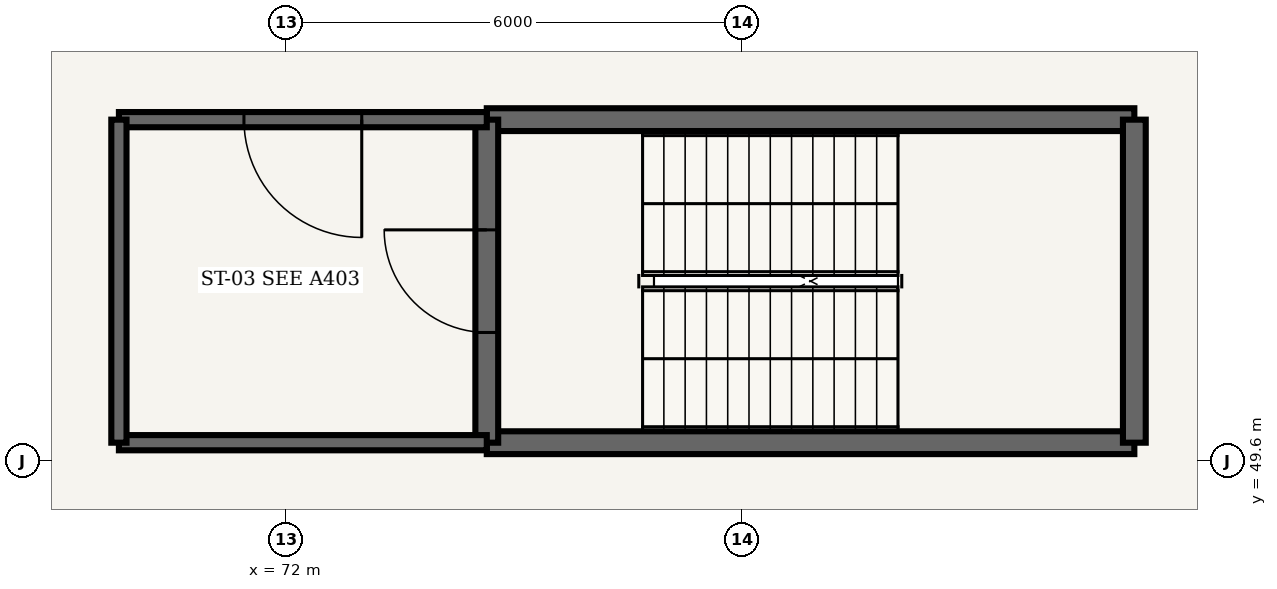
"""IFC4 building model, lengths in metres.
Left out: names, types, materials, properties, quantities, classifications, styles, units other than length and angle.
Written with IfcOpenShell. Run it as: python <this file> out.ifc"""

import sys

from ifc_helpers import new_model, si_unit, direction, frame, frame_2d, origin, place, context, subcontext, project, spatial, rectangle, extrude, element, fill, save


model = new_model("IFC4")
c1 = context("Model", 3, precision=1e-05, world=origin(), true_north=direction((0.0, 1.0)))
c2 = subcontext(c1, "Body", "Model", "MODEL_VIEW")
j1 = project(units=[si_unit("LENGTHUNIT", "METRE"), si_unit("PLANEANGLEUNIT", "RADIAN")], contexts=[c1])
p1 = place(None, origin())
s1 = spatial("IfcSite", under=j1, at=p1, CompositionType="ELEMENT")
p2 = place(p1, origin())
s2 = spatial("IfcBuilding", under=s1, at=p2, CompositionType="ELEMENT")
p3 = place(p2, frame((0.0, 0.0, 10.8)))
s3 = spatial("IfcBuildingStorey", under=s2, at=p3, CompositionType="ELEMENT", Elevation=10.8)
for number, where, z_axis, x_axis in (
    (1, (74.64, 49.84, 0.0), (0.0, 0.0, 1.0), (1.0, 0.0, 0.0)),
    (2, (83.16, 54.09, 0.0), (0.0, 0.0, 1.0), (-1.0, 0.0, 0.0)),
):
    element("IfcWall", number, at=place(p3, frame(where, z_axis=z_axis, x_axis=x_axis)), inside=s3, PredefinedType="SHEAR", context=c2, shape_type="SweptSolid", body=[
        extrude(rectangle(XDim=8.52, YDim=0.3, at=frame_2d((4.26, 0.0))), origin(), (0.0, 0.0, 1.0), 4.55),
    ])
p4 = place(p3, frame((74.64, 54.09, 0.0), z_axis=(0.0, 0.0, 1.0), x_axis=(0.0, -1.0, 0.0)))
e3 = element("IfcWall", 3, at=p4, inside=s3, PredefinedType="SHEAR", context=c2, shape_type="SweptSolid", body=[
    extrude(rectangle(XDim=4.25, YDim=0.3, at=frame_2d((2.125, 0.0))), origin(), (0.0, 0.0, 1.0), 4.55),
])
p5 = place(p4, frame((1.45, 0.0, 0.0)))
e4 = element("IfcOpeningElement", 4, at=p5, cuts=e3, PredefinedType="OPENING", context=c2, shape_type="SweptSolid", body=[
    extrude(rectangle(XDim=1.35, YDim=2.2, at=frame_2d((0.675, 1.1))), frame((0.0, 0.16, 0.0), z_axis=(0.0, -1.0, 0.0), x_axis=(1.0, 0.0, 0.0)), (0.0, 0.0, 1.0), 0.32),
])
p6 = place(p3, frame((83.16, 49.84, 0.0), z_axis=(0.0, 0.0, 1.0), x_axis=(0.0, 1.0, 0.0)))
e5 = element("IfcWall", 5, at=p6, inside=s3, PredefinedType="SHEAR", context=c2, shape_type="SweptSolid", body=[
    extrude(rectangle(XDim=4.25, YDim=0.3, at=frame_2d((2.125, 0.0))), origin(), (0.0, 0.0, 1.0), 4.55),
])
p7 = place(p3, frame((69.8, 49.84, 0.0), z_axis=(0.0, 0.0, 1.0), x_axis=(1.0, 0.0, 0.0)))
e6 = element("IfcWall", 6, at=p7, inside=s3, PredefinedType="SHEAR", context=c2, shape_type="SweptSolid", body=[
    extrude(rectangle(XDim=4.84, YDim=0.2, at=frame_2d((2.42, 0.0))), origin(), (0.0, 0.0, 1.0), 4.55),
])
p8 = place(p3, frame((74.64, 54.09, 0.0), z_axis=(0.0, 0.0, 1.0), x_axis=(-1.0, 0.0, 0.0)))
e7 = element("IfcWall", 7, at=p8, inside=s3, PredefinedType="SHEAR", context=c2, shape_type="SweptSolid", body=[
    extrude(rectangle(XDim=4.84, YDim=0.2, at=frame_2d((2.42, 0.0))), origin(), (0.0, 0.0, 1.0), 4.55),
])
p9 = place(p8, frame((1.645, 0.0, 0.0)))
e8 = element("IfcOpeningElement", 8, at=p9, cuts=e7, PredefinedType="OPENING", context=c2, shape_type="SweptSolid", body=[
    extrude(rectangle(XDim=1.55, YDim=2.2, at=frame_2d((0.775, 1.1))), frame((0.0, 0.11, 0.0), z_axis=(0.0, -1.0, 0.0), x_axis=(1.0, 0.0, 0.0)), (0.0, 0.0, 1.0), 0.22),
])
p10 = place(p3, frame((69.8, 54.09, 0.0), z_axis=(0.0, 0.0, 1.0), x_axis=(0.0, -1.0, 0.0)))
e9 = element("IfcWall", 9, at=p10, inside=s3, PredefinedType="SHEAR", context=c2, shape_type="SweptSolid", body=[
    extrude(rectangle(XDim=4.25, YDim=0.2, at=frame_2d((2.125, 0.0))), origin(), (0.0, 0.0, 1.0), 4.55),
])
p11 = place(p5, origin())
e10 = element("IfcDoor", 10, at=p11, inside=s3, OperationType="SINGLE_SWING_RIGHT", PredefinedType="DOOR", context=c2, shape_type="SweptSolid", body=[
    extrude(rectangle(XDim=1.35, YDim=2.2, at=frame_2d((0.675, 1.1))), frame((0.0, 0.025, 0.0), z_axis=(0.0, -1.0, 0.0), x_axis=(1.0, 0.0, 0.0)), (0.0, 0.0, 1.0), 0.05),
])
fill(e4, e10)
p12 = place(p9, origin())
e11 = element("IfcDoor", 11, at=p12, inside=s3, OperationType="SINGLE_SWING_LEFT", PredefinedType="DOOR", context=c2, shape_type="SweptSolid", body=[
    extrude(rectangle(XDim=1.55, YDim=2.2, at=frame_2d((0.775, 1.1))), frame((0.0, 0.025, 0.0), z_axis=(0.0, -1.0, 0.0), x_axis=(1.0, 0.0, 0.0)), (0.0, 0.0, 1.0), 0.05),
])
fill(e8, e11)
save(model, sys.argv[1])
